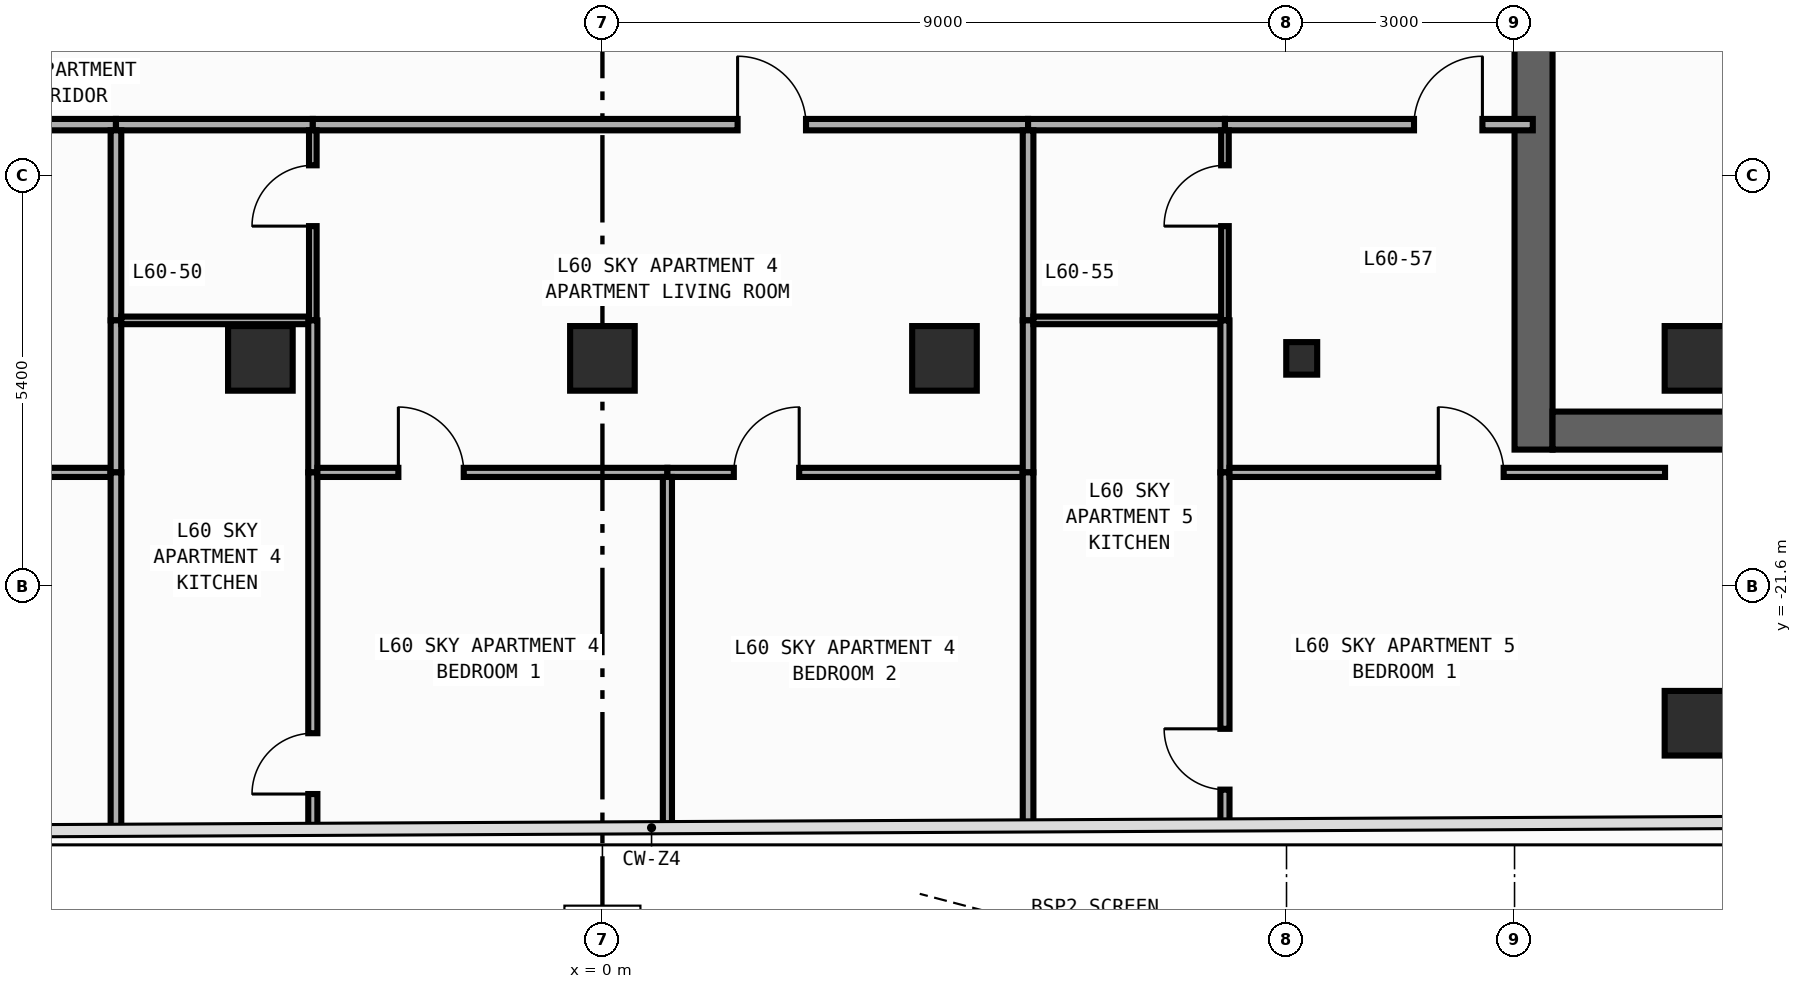
"""IFC4 building model, lengths in metres.
Left out: names, types, materials, properties, quantities, classifications, styles, units other than length and angle.
Written with IfcOpenShell. Run it as: python <this file> out.ifc"""

import sys

from ifc_helpers import new_model, si_unit, direction, frame, frame_2d, origin, origin_2d, place, context, subcontext, project, spatial, rectangle, i_section, extrude, element, fill, save


model = new_model("IFC4")
c1 = context("Model", 3, precision=1e-05, world=origin(), true_north=direction((0.0, 1.0)))
c2 = subcontext(c1, "Body", "Model", "MODEL_VIEW")
j1 = project(units=[si_unit("LENGTHUNIT", "METRE"), si_unit("PLANEANGLEUNIT", "RADIAN")], contexts=[c1])
p1 = place(None, origin())
s1 = spatial("IfcSite", under=j1, at=p1, CompositionType="ELEMENT")
p2 = place(p1, origin())
s2 = spatial("IfcBuilding", under=s1, at=p2, CompositionType="ELEMENT")
p3 = place(p2, frame((0.0, 0.0, 254.8)))
s3 = spatial("IfcBuildingStorey", under=s2, at=p3, CompositionType="ELEMENT", Elevation=254.8)
p4 = place(p3, frame((12.25, -19.8, 0.0), z_axis=(0.0, 0.0, 1.0), x_axis=(0.0, 1.0, 0.0)))
e1 = element("IfcWall", 1, at=p4, inside=s3, PredefinedType="SHEAR", context=c2, shape_type="SweptSolid", body=[
    extrude(rectangle(XDim=27.0, YDim=0.5, at=frame_2d((13.5, 0.0))), origin(), (0.0, 0.0, 1.0), 3.34),
])
p5 = place(p4, frame((23.05, 0.0, 0.0)))
e2 = element("IfcOpeningElement", 2, at=p5, cuts=e1, PredefinedType="OPENING", context=c2, shape_type="SweptSolid", body=[
    extrude(rectangle(XDim=1.1, YDim=2.2, at=frame_2d((0.55, 1.1))), frame((0.0, 0.26, 0.0), z_axis=(0.0, -1.0, 0.0), x_axis=(1.0, 0.0, 0.0)), (0.0, 0.0, 1.0), 0.52),
])
p6 = place(p4, frame((19.85, 0.0, 0.0)))
e3 = element("IfcOpeningElement", 3, at=p6, cuts=e1, PredefinedType="OPENING", context=c2, shape_type="SweptSolid", body=[
    extrude(rectangle(XDim=1.1, YDim=2.2, at=frame_2d((0.55, 1.1))), frame((0.0, 0.26, 0.0), z_axis=(0.0, -1.0, 0.0), x_axis=(1.0, 0.0, 0.0)), (0.0, 0.0, 1.0), 0.52),
])
p7 = place(p4, frame((16.65, 0.0, 0.0)))
e4 = element("IfcOpeningElement", 4, at=p7, cuts=e1, PredefinedType="OPENING", context=c2, shape_type="SweptSolid", body=[
    extrude(rectangle(XDim=1.1, YDim=2.2, at=frame_2d((0.55, 1.1))), frame((0.0, 0.26, 0.0), z_axis=(0.0, -1.0, 0.0), x_axis=(1.0, 0.0, 0.0)), (0.0, 0.0, 1.0), 0.52),
])
p8 = place(p4, frame((7.175, 0.0, 0.0)))
e5 = element("IfcOpeningElement", 5, at=p8, cuts=e1, PredefinedType="OPENING", context=c2, shape_type="SweptSolid", body=[
    extrude(rectangle(XDim=0.85, YDim=2.1, at=frame_2d((0.425, 1.05))), frame((0.0, 0.26, 0.0), z_axis=(0.0, -1.0, 0.0), x_axis=(1.0, 0.0, 0.0)), (0.0, 0.0, 1.0), 0.52),
])
p9 = place(p4, frame((10.375, 0.0, 0.0)))
e6 = element("IfcOpeningElement", 6, at=p9, cuts=e1, PredefinedType="OPENING", context=c2, shape_type="SweptSolid", body=[
    extrude(rectangle(XDim=0.85, YDim=2.1, at=frame_2d((0.425, 1.05))), frame((0.0, 0.26, 0.0), z_axis=(0.0, -1.0, 0.0), x_axis=(1.0, 0.0, 0.0)), (0.0, 0.0, 1.0), 0.52),
])
p10 = place(p4, frame((12.725, 0.0, 0.0)))
e7 = element("IfcOpeningElement", 7, at=p10, cuts=e1, PredefinedType="OPENING", context=c2, shape_type="SweptSolid", body=[
    extrude(rectangle(XDim=1.15, YDim=2.2, at=frame_2d((0.575, 1.1))), frame((0.0, 0.26, 0.0), z_axis=(0.0, -1.0, 0.0), x_axis=(1.0, 0.0, 0.0)), (0.0, 0.0, 1.0), 0.52),
])
p11 = place(p4, frame((25.125, 0.0, 0.0)))
e8 = element("IfcOpeningElement", 8, at=p11, cuts=e1, PredefinedType="OPENING", context=c2, shape_type="SweptSolid", body=[
    extrude(rectangle(XDim=0.85, YDim=2.1, at=frame_2d((0.425, 1.05))), frame((0.0, 0.26, 0.0), z_axis=(0.0, -1.0, 0.0), x_axis=(1.0, 0.0, 0.0)), (0.0, 0.0, 1.0), 0.52),
])
p12 = place(p3, frame((12.5, -19.55, 0.0), z_axis=(0.0, 0.0, 1.0), x_axis=(1.0, 0.0, 0.0)))
e9 = element("IfcWall", 9, at=p12, inside=s3, PredefinedType="SHEAR", context=c2, shape_type="SweptSolid", body=[
    extrude(rectangle(XDim=7.4, YDim=0.5, at=frame_2d((3.7, 0.0))), origin(), (0.0, 0.0, 1.0), 3.34),
])
p13 = place(p3, frame((9.2, -18.6, 0.0), z_axis=(0.0, 0.0, 1.0), x_axis=(1.0, 0.0, 0.0)))
e10 = element("IfcColumn", 10, at=p13, inside=s3, PredefinedType="COLUMN", context=c2, shape_type="SweptSolid", body=[
    extrude(i_section(OverallWidth=0.407, OverallDepth=0.428, WebThickness=0.02, FlangeThickness=0.035, FilletRadius=0.022, at=origin_2d()), origin(), (0.0, 0.0, 1.0), 3.6),
])
for number, where, z_axis, x_axis in (
    (11, (14.4, -18.6, 0.0), (0.0, 0.0, 1.0), (1.0, 0.0, 0.0)),
    (12, (-4.5, -18.6, 0.0), (0.0, 0.0, 1.0), (1.0, 0.0, 0.0)),
    (13, (0.0, -18.6, 0.0), (0.0, 0.0, 1.0), (1.0, 0.0, 0.0)),
    (14, (4.5, -18.6, 0.0), (0.0, 0.0, 1.0), (1.0, 0.0, 0.0)),
    (15, (14.4, -23.4, 0.0), (0.0, 0.0, 1.0), (1.0, 0.0, 0.0)),
):
    element("IfcColumn", number, at=place(p3, frame(where, z_axis=z_axis, x_axis=x_axis)), inside=s3, PredefinedType="COLUMN", context=c2, shape_type="SweptSolid", body=[
        extrude(rectangle(XDim=0.85, YDim=0.85, at=origin_2d()), origin(), (0.0, 0.0, 1.0), 3.6),
    ])
p14 = place(p3, frame((-19.31, -15.525, 0.0), z_axis=(0.0, 0.0, 1.0), x_axis=(1.0, 0.0, 0.0)))
e16 = element("IfcWall", 16, at=p14, inside=s3, PredefinedType="PARTITIONING", context=c2, shape_type="SweptSolid", body=[
    extrude(rectangle(XDim=12.91, YDim=0.15, at=frame_2d((6.455, 0.0))), origin(), (0.0, 0.0, 1.0), 3.34),
])
p15 = place(p14, frame((1.468, 0.0, 0.0)))
e17 = element("IfcOpeningElement", 17, at=p15, cuts=e16, PredefinedType="OPENING", context=c2, shape_type="SweptSolid", body=[
    extrude(rectangle(XDim=0.9, YDim=2.15, at=frame_2d((0.45, 1.075))), frame((0.0, 0.085, 0.0), z_axis=(0.0, -1.0, 0.0), x_axis=(1.0, 0.0, 0.0)), (0.0, 0.0, 1.0), 0.17),
])
p16 = place(p3, frame((-6.4, -15.525, 0.0), z_axis=(0.0, 0.0, 1.0), x_axis=(1.0, 0.0, 0.0)))
e18 = element("IfcWall", 18, at=p16, inside=s3, PredefinedType="PARTITIONING", context=c2, shape_type="SweptSolid", body=[
    extrude(rectangle(XDim=2.59, YDim=0.15, at=frame_2d((1.295, 0.0))), origin(), (0.0, 0.0, 1.0), 3.34),
])
p17 = place(p3, frame((-3.81, -15.525, 0.0), z_axis=(0.0, 0.0, 1.0), x_axis=(1.0, 0.0, 0.0)))
e19 = element("IfcWall", 19, at=p17, inside=s3, PredefinedType="PARTITIONING", context=c2, shape_type="SweptSolid", body=[
    extrude(rectangle(XDim=9.41, YDim=0.15, at=frame_2d((4.705, 0.0))), origin(), (0.0, 0.0, 1.0), 3.34),
])
p18 = place(p17, frame((5.588, 0.0, 0.0)))
e20 = element("IfcOpeningElement", 20, at=p18, cuts=e19, PredefinedType="OPENING", context=c2, shape_type="SweptSolid", body=[
    extrude(rectangle(XDim=0.9, YDim=2.15, at=frame_2d((0.45, 1.075))), frame((0.0, 0.085, 0.0), z_axis=(0.0, -1.0, 0.0), x_axis=(1.0, 0.0, 0.0)), (0.0, 0.0, 1.0), 0.17),
])
p19 = place(p3, frame((5.6, -15.525, 0.0), z_axis=(0.0, 0.0, 1.0), x_axis=(1.0, 0.0, 0.0)))
e21 = element("IfcWall", 21, at=p19, inside=s3, PredefinedType="PARTITIONING", context=c2, shape_type="SweptSolid", body=[
    extrude(rectangle(XDim=2.59, YDim=0.15, at=frame_2d((1.295, 0.0))), origin(), (0.0, 0.0, 1.0), 3.34),
])
p20 = place(p3, frame((8.19, -15.525, 0.0), z_axis=(0.0, 0.0, 1.0), x_axis=(1.0, 0.0, 0.0)))
e22 = element("IfcWall", 22, at=p20, inside=s3, PredefinedType="PARTITIONING", context=c2, shape_type="SweptSolid", body=[
    extrude(rectangle(XDim=4.05, YDim=0.15, at=frame_2d((2.025, 0.0))), origin(), (0.0, 0.0, 1.0), 3.34),
])
p21 = place(p20, frame((2.487, 0.0, 0.0)))
e23 = element("IfcOpeningElement", 23, at=p21, cuts=e22, PredefinedType="OPENING", context=c2, shape_type="SweptSolid", body=[
    extrude(rectangle(XDim=0.9, YDim=2.15, at=frame_2d((0.45, 1.075))), frame((0.0, 0.085, 0.0), z_axis=(0.0, -1.0, 0.0), x_axis=(1.0, 0.0, 0.0)), (0.0, 0.0, 1.0), 0.17),
])
p22 = place(p3, frame((-12.895, -20.1, 0.0), z_axis=(0.0, 0.0, 1.0), x_axis=(1.0, 0.0, 0.0)))
e24 = element("IfcWall", 24, at=p22, inside=s3, PredefinedType="PARTITIONING", context=c2, shape_type="SweptSolid", body=[
    extrude(rectangle(XDim=6.425, YDim=0.12, at=frame_2d((3.212, 0.0))), origin(), (0.0, 0.0, 1.0), 3.34),
])
p23 = place(p22, frame((0.864, 0.0, 0.0)))
e25 = element("IfcOpeningElement", 25, at=p23, cuts=e24, PredefinedType="OPENING", context=c2, shape_type="SweptSolid", body=[
    extrude(rectangle(XDim=0.86, YDim=2.15, at=frame_2d((0.43, 1.075))), frame((0.0, 0.07, 0.0), z_axis=(0.0, -1.0, 0.0), x_axis=(1.0, 0.0, 0.0)), (0.0, 0.0, 1.0), 0.14),
])
p24 = place(p3, frame((-6.4, -18.1, 0.0), z_axis=(0.0, 0.0, 1.0), x_axis=(0.0, 1.0, 0.0)))
e26 = element("IfcWall", 26, at=p24, inside=s3, PredefinedType="PARTITIONING", context=c2, shape_type="SweptSolid", body=[
    extrude(rectangle(XDim=2.5, YDim=0.14, at=frame_2d((1.25, 0.0))), origin(), (0.0, 0.0, 1.0), 3.34),
])
p25 = place(p3, frame((-6.4, -20.1, 0.0), z_axis=(0.0, 0.0, 1.0), x_axis=(0.0, 1.0, 0.0)))
e27 = element("IfcWall", 27, at=p25, inside=s3, PredefinedType="PARTITIONING", context=c2, shape_type="SweptSolid", body=[
    extrude(rectangle(XDim=2.0, YDim=0.14, at=frame_2d((1.0, 0.0))), origin(), (0.0, 0.0, 1.0), 3.34),
])
p26 = place(p3, frame((-6.4, -24.804, 0.0), z_axis=(0.0, 0.0, 1.0), x_axis=(0.0, 1.0, 0.0)))
e28 = element("IfcWall", 28, at=p26, inside=s3, PredefinedType="PARTITIONING", context=c2, shape_type="SweptSolid", body=[
    extrude(rectangle(XDim=4.704, YDim=0.14, at=frame_2d((2.352, 0.0))), origin(), (0.0, 0.0, 1.0), 3.34),
])
p27 = place(p3, frame((-6.33, -18.1, 0.0), z_axis=(0.0, 0.0, 1.0), x_axis=(1.0, 0.0, 0.0)))
e29 = element("IfcWall", 29, at=p27, inside=s3, PredefinedType="PARTITIONING", context=c2, shape_type="SweptSolid", body=[
    extrude(rectangle(XDim=2.47, YDim=0.1, at=frame_2d((1.235, 0.0))), origin(), (0.0, 0.0, 1.0), 3.34),
])
p28 = place(p3, frame((-3.81, -18.1, 0.0), z_axis=(0.0, 0.0, 1.0), x_axis=(0.0, 1.0, 0.0)))
e30 = element("IfcWall", 30, at=p28, inside=s3, PredefinedType="PARTITIONING", context=c2, shape_type="SweptSolid", body=[
    extrude(rectangle(XDim=2.5, YDim=0.1, at=frame_2d((1.25, 0.0))), origin(), (0.0, 0.0, 1.0), 3.34),
])
p29 = place(p28, frame((1.24, 0.0, 0.0)))
e31 = element("IfcOpeningElement", 31, at=p29, cuts=e30, PredefinedType="OPENING", context=c2, shape_type="SweptSolid", body=[
    extrude(rectangle(XDim=0.8, YDim=2.1, at=frame_2d((0.4, 1.05))), frame((0.0, 0.06, 0.0), z_axis=(0.0, -1.0, 0.0), x_axis=(1.0, 0.0, 0.0)), (0.0, 0.0, 1.0), 0.12),
])
p30 = place(p3, frame((-3.81, -20.1, 0.0), z_axis=(0.0, 0.0, 1.0), x_axis=(0.0, 1.0, 0.0)))
e32 = element("IfcWall", 32, at=p30, inside=s3, PredefinedType="PARTITIONING", context=c2, shape_type="SweptSolid", body=[
    extrude(rectangle(XDim=2.0, YDim=0.12, at=frame_2d((1.0, 0.0))), origin(), (0.0, 0.0, 1.0), 3.34),
])
p31 = place(p3, frame((-3.81, -24.792, 0.0), z_axis=(0.0, 0.0, 1.0), x_axis=(0.0, 1.0, 0.0)))
e33 = element("IfcWall", 33, at=p31, inside=s3, PredefinedType="PARTITIONING", context=c2, shape_type="SweptSolid", body=[
    extrude(rectangle(XDim=4.691, YDim=0.12, at=frame_2d((2.346, 0.0))), origin(), (0.0, 0.0, 1.0), 3.34),
])
p32 = place(p31, frame((0.46, 0.0, 0.0)))
e34 = element("IfcOpeningElement", 34, at=p32, cuts=e33, PredefinedType="OPENING", context=c2, shape_type="SweptSolid", body=[
    extrude(rectangle(XDim=0.8, YDim=2.1, at=frame_2d((0.4, 1.05))), frame((0.0, 0.07, 0.0), z_axis=(0.0, -1.0, 0.0), x_axis=(1.0, 0.0, 0.0)), (0.0, 0.0, 1.0), 0.14),
])
p33 = place(p3, frame((-3.75, -20.1, 0.0), z_axis=(0.0, 0.0, 1.0), x_axis=(1.0, 0.0, 0.0)))
e35 = element("IfcWall", 35, at=p33, inside=s3, PredefinedType="PARTITIONING", context=c2, shape_type="SweptSolid", body=[
    extrude(rectangle(XDim=4.605, YDim=0.12, at=frame_2d((2.302, 0.0))), origin(), (0.0, 0.0, 1.0), 3.34),
])
p34 = place(p33, frame((1.065, 0.0, 0.0)))
e36 = element("IfcOpeningElement", 36, at=p34, cuts=e35, PredefinedType="OPENING", context=c2, shape_type="SweptSolid", body=[
    extrude(rectangle(XDim=0.86, YDim=2.15, at=frame_2d((0.43, 1.075))), frame((0.0, 0.07, 0.0), z_axis=(0.0, -1.0, 0.0), x_axis=(1.0, 0.0, 0.0)), (0.0, 0.0, 1.0), 0.14),
])
p35 = place(p3, frame((0.855, -20.1, 0.0), z_axis=(0.0, 0.0, 1.0), x_axis=(1.0, 0.0, 0.0)))
e37 = element("IfcWall", 37, at=p35, inside=s3, PredefinedType="PARTITIONING", context=c2, shape_type="SweptSolid", body=[
    extrude(rectangle(XDim=4.675, YDim=0.12, at=frame_2d((2.337, 0.0))), origin(), (0.0, 0.0, 1.0), 3.34),
])
p36 = place(p35, frame((0.874, 0.0, 0.0)))
e38 = element("IfcOpeningElement", 38, at=p36, cuts=e37, PredefinedType="OPENING", context=c2, shape_type="SweptSolid", body=[
    extrude(rectangle(XDim=0.86, YDim=2.15, at=frame_2d((0.43, 1.075))), frame((0.0, 0.07, 0.0), z_axis=(0.0, -1.0, 0.0), x_axis=(1.0, 0.0, 0.0)), (0.0, 0.0, 1.0), 0.14),
])
p37 = place(p3, frame((5.6, -18.1, 0.0), z_axis=(0.0, 0.0, 1.0), x_axis=(0.0, 1.0, 0.0)))
e39 = element("IfcWall", 39, at=p37, inside=s3, PredefinedType="PARTITIONING", context=c2, shape_type="SweptSolid", body=[
    extrude(rectangle(XDim=2.5, YDim=0.14, at=frame_2d((1.25, 0.0))), origin(), (0.0, 0.0, 1.0), 3.34),
])
p38 = place(p3, frame((5.6, -20.1, 0.0), z_axis=(0.0, 0.0, 1.0), x_axis=(0.0, 1.0, 0.0)))
e40 = element("IfcWall", 40, at=p38, inside=s3, PredefinedType="PARTITIONING", context=c2, shape_type="SweptSolid", body=[
    extrude(rectangle(XDim=2.0, YDim=0.14, at=frame_2d((1.0, 0.0))), origin(), (0.0, 0.0, 1.0), 3.34),
])
p39 = place(p3, frame((0.855, -24.769, 0.0), z_axis=(0.0, 0.0, 1.0), x_axis=(0.0, 1.0, 0.0)))
e41 = element("IfcWall", 41, at=p39, inside=s3, PredefinedType="PARTITIONING", context=c2, shape_type="SweptSolid", body=[
    extrude(rectangle(XDim=4.609, YDim=0.12, at=frame_2d((2.304, 0.0))), origin(), (0.0, 0.0, 1.0), 3.34),
])
p40 = place(p3, frame((5.6, -24.746, 0.0), z_axis=(0.0, 0.0, 1.0), x_axis=(0.0, 1.0, 0.0)))
e42 = element("IfcWall", 42, at=p40, inside=s3, PredefinedType="PARTITIONING", context=c2, shape_type="SweptSolid", body=[
    extrude(rectangle(XDim=4.646, YDim=0.14, at=frame_2d((2.323, 0.0))), origin(), (0.0, 0.0, 1.0), 3.34),
])
p41 = place(p3, frame((5.67, -18.1, 0.0), z_axis=(0.0, 0.0, 1.0), x_axis=(1.0, 0.0, 0.0)))
e43 = element("IfcWall", 43, at=p41, inside=s3, PredefinedType="PARTITIONING", context=c2, shape_type="SweptSolid", body=[
    extrude(rectangle(XDim=2.47, YDim=0.1, at=frame_2d((1.235, 0.0))), origin(), (0.0, 0.0, 1.0), 3.34),
])
p42 = place(p3, frame((8.19, -18.1, 0.0), z_axis=(0.0, 0.0, 1.0), x_axis=(0.0, 1.0, 0.0)))
e44 = element("IfcWall", 44, at=p42, inside=s3, PredefinedType="PARTITIONING", context=c2, shape_type="SweptSolid", body=[
    extrude(rectangle(XDim=2.5, YDim=0.1, at=frame_2d((1.25, 0.0))), origin(), (0.0, 0.0, 1.0), 3.34),
])
p43 = place(p42, frame((1.24, 0.0, 0.0)))
e45 = element("IfcOpeningElement", 45, at=p43, cuts=e44, PredefinedType="OPENING", context=c2, shape_type="SweptSolid", body=[
    extrude(rectangle(XDim=0.8, YDim=2.1, at=frame_2d((0.4, 1.05))), frame((0.0, 0.06, 0.0), z_axis=(0.0, -1.0, 0.0), x_axis=(1.0, 0.0, 0.0)), (0.0, 0.0, 1.0), 0.12),
])
p44 = place(p3, frame((8.19, -20.1, 0.0), z_axis=(0.0, 0.0, 1.0), x_axis=(0.0, 1.0, 0.0)))
e46 = element("IfcWall", 46, at=p44, inside=s3, PredefinedType="PARTITIONING", context=c2, shape_type="SweptSolid", body=[
    extrude(rectangle(XDim=2.0, YDim=0.12, at=frame_2d((1.0, 0.0))), origin(), (0.0, 0.0, 1.0), 3.34),
])
p45 = place(p3, frame((8.19, -24.733, 0.0), z_axis=(0.0, 0.0, 1.0), x_axis=(0.0, 1.0, 0.0)))
e47 = element("IfcWall", 47, at=p45, inside=s3, PredefinedType="PARTITIONING", context=c2, shape_type="SweptSolid", body=[
    extrude(rectangle(XDim=4.633, YDim=0.12, at=frame_2d((2.317, 0.0))), origin(), (0.0, 0.0, 1.0), 3.34),
])
p46 = place(p45, frame((0.46, 0.0, 0.0)))
e48 = element("IfcOpeningElement", 48, at=p46, cuts=e47, PredefinedType="OPENING", context=c2, shape_type="SweptSolid", body=[
    extrude(rectangle(XDim=0.8, YDim=2.1, at=frame_2d((0.4, 1.05))), frame((0.0, 0.07, 0.0), z_axis=(0.0, -1.0, 0.0), x_axis=(1.0, 0.0, 0.0)), (0.0, 0.0, 1.0), 0.14),
])
p47 = place(p3, frame((8.25, -20.1, 0.0), z_axis=(0.0, 0.0, 1.0), x_axis=(1.0, 0.0, 0.0)))
e49 = element("IfcWall", 49, at=p47, inside=s3, PredefinedType="PARTITIONING", context=c2, shape_type="SweptSolid", body=[
    extrude(rectangle(XDim=5.73, YDim=0.12, at=frame_2d((2.865, 0.0))), origin(), (0.0, 0.0, 1.0), 3.34),
])
p48 = place(p47, frame((2.747, 0.0, 0.0)))
e50 = element("IfcOpeningElement", 50, at=p48, cuts=e49, PredefinedType="OPENING", context=c2, shape_type="SweptSolid", body=[
    extrude(rectangle(XDim=0.86, YDim=2.15, at=frame_2d((0.43, 1.075))), frame((0.0, 0.07, 0.0), z_axis=(0.0, -1.0, 0.0), x_axis=(1.0, 0.0, 0.0)), (0.0, 0.0, 1.0), 0.14),
])
p49 = place(p18, origin())
e51 = element("IfcDoor", 51, at=p49, inside=s3, OperationType="SINGLE_SWING_LEFT", PredefinedType="DOOR", context=c2, shape_type="SweptSolid", body=[
    extrude(rectangle(XDim=0.9, YDim=2.15, at=frame_2d((0.45, 1.075))), frame((0.0, 0.025, 0.0), z_axis=(0.0, -1.0, 0.0), x_axis=(1.0, 0.0, 0.0)), (0.0, 0.0, 1.0), 0.05),
])
fill(e20, e51)
p50 = place(p21, origin())
e52 = element("IfcDoor", 52, at=p50, inside=s3, OperationType="SINGLE_SWING_RIGHT", PredefinedType="DOOR", context=c2, shape_type="SweptSolid", body=[
    extrude(rectangle(XDim=0.9, YDim=2.15, at=frame_2d((0.45, 1.075))), frame((0.0, 0.025, 0.0), z_axis=(0.0, -1.0, 0.0), x_axis=(1.0, 0.0, 0.0)), (0.0, 0.0, 1.0), 0.05),
])
fill(e23, e52)
p51 = place(p29, origin())
e53 = element("IfcDoor", 53, at=p51, inside=s3, OperationType="SINGLE_SWING_LEFT", PredefinedType="DOOR", context=c2, shape_type="SweptSolid", body=[
    extrude(rectangle(XDim=0.8, YDim=2.1, at=frame_2d((0.4, 1.05))), frame((0.0, 0.025, 0.0), z_axis=(0.0, -1.0, 0.0), x_axis=(1.0, 0.0, 0.0)), (0.0, 0.0, 1.0), 0.05),
])
fill(e31, e53)
p52 = place(p34, origin())
e54 = element("IfcDoor", 54, at=p52, inside=s3, OperationType="SINGLE_SWING_LEFT", PredefinedType="DOOR", context=c2, shape_type="SweptSolid", body=[
    extrude(rectangle(XDim=0.86, YDim=2.15, at=frame_2d((0.43, 1.075))), frame((0.0, 0.025, 0.0), z_axis=(0.0, -1.0, 0.0), x_axis=(1.0, 0.0, 0.0)), (0.0, 0.0, 1.0), 0.05),
])
fill(e36, e54)
p53 = place(p36, origin())
e55 = element("IfcDoor", 55, at=p53, inside=s3, OperationType="SINGLE_SWING_RIGHT", PredefinedType="DOOR", context=c2, shape_type="SweptSolid", body=[
    extrude(rectangle(XDim=0.86, YDim=2.15, at=frame_2d((0.43, 1.075))), frame((0.0, 0.025, 0.0), z_axis=(0.0, -1.0, 0.0), x_axis=(1.0, 0.0, 0.0)), (0.0, 0.0, 1.0), 0.05),
])
fill(e38, e55)
p54 = place(p43, origin())
e56 = element("IfcDoor", 56, at=p54, inside=s3, OperationType="SINGLE_SWING_LEFT", PredefinedType="DOOR", context=c2, shape_type="SweptSolid", body=[
    extrude(rectangle(XDim=0.8, YDim=2.1, at=frame_2d((0.4, 1.05))), frame((0.0, 0.025, 0.0), z_axis=(0.0, -1.0, 0.0), x_axis=(1.0, 0.0, 0.0)), (0.0, 0.0, 1.0), 0.05),
])
fill(e45, e56)
p55 = place(p48, origin())
e57 = element("IfcDoor", 57, at=p55, inside=s3, OperationType="SINGLE_SWING_LEFT", PredefinedType="DOOR", context=c2, shape_type="SweptSolid", body=[
    extrude(rectangle(XDim=0.86, YDim=2.15, at=frame_2d((0.43, 1.075))), frame((0.0, 0.025, 0.0), z_axis=(0.0, -1.0, 0.0), x_axis=(1.0, 0.0, 0.0)), (0.0, 0.0, 1.0), 0.05),
])
fill(e50, e57)
p56 = place(p32, origin())
e58 = element("IfcDoor", 58, at=p56, inside=s3, OperationType="SINGLE_SWING_LEFT", PredefinedType="DOOR", context=c2, shape_type="SweptSolid", body=[
    extrude(rectangle(XDim=0.8, YDim=2.1, at=frame_2d((0.4, 1.05))), frame((0.0, 0.025, 0.0), z_axis=(0.0, -1.0, 0.0), x_axis=(1.0, 0.0, 0.0)), (0.0, 0.0, 1.0), 0.05),
])
fill(e34, e58)
p57 = place(p46, origin())
e59 = element("IfcDoor", 59, at=p57, inside=s3, OperationType="SINGLE_SWING_RIGHT", PredefinedType="DOOR", context=c2, shape_type="SweptSolid", body=[
    extrude(rectangle(XDim=0.8, YDim=2.1, at=frame_2d((0.4, 1.05))), frame((0.0, 0.025, 0.0), z_axis=(0.0, -1.0, 0.0), x_axis=(1.0, 0.0, 0.0)), (0.0, 0.0, 1.0), 0.05),
])
fill(e48, e59)
save(model, sys.argv[1])
